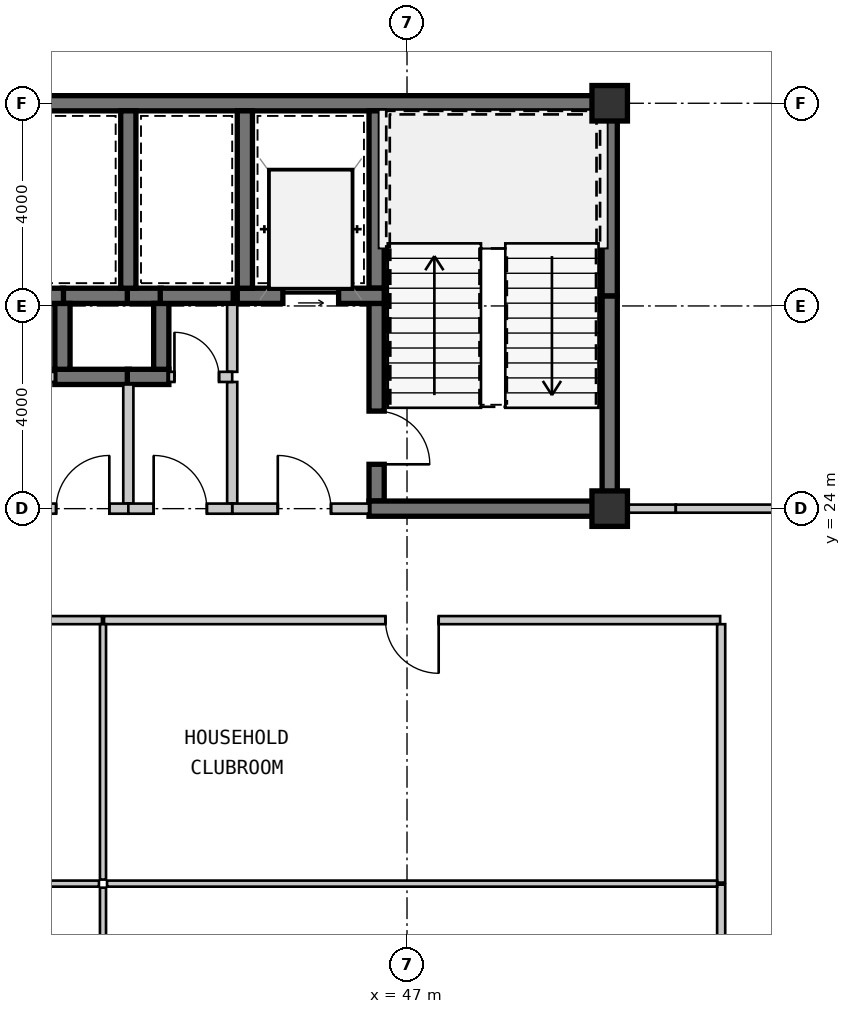
"""IFC4 building model, lengths in metres.
Left out: names, types, materials, properties, quantities, classifications, styles, units other than length and angle.
Written with IfcOpenShell. Run it as: python <this file> out.ifc"""

import sys

from ifc_helpers import new_model, si_unit, direction, frame, frame_2d, origin, origin_2d, place, context, subcontext, project, spatial, rectangle, extrude, source, transform, mapped, element, fill, save


model = new_model("IFC4")
c1 = context("Model", 3, precision=1e-05, world=origin(), true_north=direction((0.0, 1.0)))
c2 = subcontext(c1, "Body", "Model", "MODEL_VIEW")
j1 = project(units=[si_unit("LENGTHUNIT", "METRE"), si_unit("PLANEANGLEUNIT", "RADIAN")], contexts=[c1])
p1 = place(None, origin())
s1 = spatial("IfcSite", under=j1, at=p1, CompositionType="ELEMENT")
p2 = place(p1, origin())
s2 = spatial("IfcBuilding", under=s1, at=p2, CompositionType="ELEMENT")
p3 = place(p2, frame((0.0, 0.0, 99.75)))
s3 = spatial("IfcBuildingStorey", under=s2, at=p3, CompositionType="ELEMENT", Elevation=99.75)
m1 = source(origin(), c2, "Body", "SweptSolid", [
    extrude(rectangle(XDim=0.7, YDim=0.7, at=origin_2d()), origin(), (0.0, 0.0, 1.0), 3.15),
])
for number, where, z_axis, x_axis in (
    (1, (51.0, 24.0, 0.0), (0.0, 0.0, 1.0), (1.0, 0.0, 0.0)),
    (2, (51.0, 32.0, 0.0), (0.0, 0.0, 1.0), (1.0, 0.0, 0.0)),
):
    element("IfcColumn", number, at=place(p3, frame(where, z_axis=z_axis, x_axis=x_axis)), inside=s3, PredefinedType="COLUMN", context=c2, shape_type="MappedRepresentation", body=[
        mapped(m1, transform((0.0, 0.0, 0.0), scale=1.0)),
    ])
m2 = source(origin(), c2, "Body", "SweptSolid", [
    extrude(rectangle(XDim=11.95, YDim=0.3, at=frame_2d((5.975, 0.0))), origin(), (0.0, 0.0, 1.0), 2.93),
])
p4 = place(p3, frame((39.2, 32.0, 0.0), z_axis=(0.0, 0.0, 1.0), x_axis=(1.0, 0.0, 0.0)))
e3 = element("IfcWall", 3, at=p4, inside=s3, PredefinedType="SHEAR", context=c2, shape_type="MappedRepresentation", body=[
    mapped(m2, transform((0.0, 0.0, 0.0), scale=1.0)),
])
m3 = source(origin(), c2, "Body", "SweptSolid", [
    extrude(rectangle(XDim=4.05, YDim=0.3, at=frame_2d((2.025, 0.0))), origin(), (0.0, 0.0, 1.0), 2.93),
])
p5 = place(p3, frame((51.0, 24.15, 0.0), z_axis=(0.0, 0.0, 1.0), x_axis=(0.0, 1.0, 0.0)))
e4 = element("IfcWall", 4, at=p5, inside=s3, PredefinedType="SHEAR", context=c2, shape_type="MappedRepresentation", body=[
    mapped(m3, transform((0.0, 0.0, 0.0), scale=1.0)),
])
m4 = source(origin(), c2, "Body", "SweptSolid", [
    extrude(rectangle(XDim=3.65, YDim=0.3, at=frame_2d((1.825, 0.0))), origin(), (0.0, 0.0, 1.0), 2.93),
])
p6 = place(p3, frame((51.0, 28.2, 0.0), z_axis=(0.0, 0.0, 1.0), x_axis=(0.0, 1.0, 0.0)))
e5 = element("IfcWall", 5, at=p6, inside=s3, PredefinedType="SHEAR", context=c2, shape_type="MappedRepresentation", body=[
    mapped(m4, transform((0.0, 0.0, 0.0), scale=1.0)),
])
m5 = source(origin(), c2, "Body", "SweptSolid", [
    extrude(rectangle(XDim=3.5, YDim=0.3, at=frame_2d((1.75, 0.0))), origin(), (0.0, 0.0, 1.0), 2.93),
])
p7 = place(p3, frame((46.4, 31.85, 0.0), z_axis=(0.0, 0.0, 1.0), x_axis=(0.0, -1.0, 0.0)))
e6 = element("IfcWall", 6, at=p7, inside=s3, PredefinedType="SHEAR", context=c2, shape_type="MappedRepresentation", body=[
    mapped(m5, transform((0.0, 0.0, 0.0), scale=1.0)),
])
m6 = source(origin(), c2, "Body", "SweptSolid", [
    extrude(rectangle(XDim=3.9, YDim=0.3, at=frame_2d((1.95, 0.0))), origin(), (0.0, 0.0, 1.0), 2.93),
])
p8 = place(p3, frame((46.4, 28.05, 0.0), z_axis=(0.0, 0.0, 1.0), x_axis=(0.0, -1.0, 0.0)))
e7 = element("IfcWall", 7, at=p8, inside=s3, PredefinedType="SHEAR", context=c2, shape_type="MappedRepresentation", body=[
    mapped(m6, transform((0.0, 0.0, 0.0), scale=1.0)),
])
m7 = source(origin(), c2, "Body", "SweptSolid", [
    extrude(rectangle(XDim=1.05, YDim=2.1, at=frame_2d((0.525, 1.05))), frame((0.0, 0.16, 0.0), z_axis=(0.0, -1.0, 0.0), x_axis=(1.0, 0.0, 0.0)), (0.0, 0.0, 1.0), 0.32),
])
p9 = place(p8, frame((2.125, 0.0, 0.0)))
e8 = element("IfcOpeningElement", 8, at=p9, cuts=e7, PredefinedType="OPENING", context=c2, shape_type="MappedRepresentation", body=[
    mapped(m7, transform((0.0, 0.0, 0.0), scale=1.0)),
])
m8 = source(origin(), c2, "Body", "SweptSolid", [
    extrude(rectangle(XDim=4.9, YDim=0.3, at=frame_2d((2.45, 0.0))), origin(), (0.0, 0.0, 1.0), 2.93),
])
p10 = place(p3, frame((46.25, 24.0, 0.0), z_axis=(0.0, 0.0, 1.0), x_axis=(1.0, 0.0, 0.0)))
e9 = element("IfcWall", 9, at=p10, inside=s3, PredefinedType="SHEAR", context=c2, shape_type="MappedRepresentation", body=[
    mapped(m8, transform((0.0, 0.0, 0.0), scale=1.0)),
])
m9 = source(origin(), c2, "Body", "SweptSolid", [
    extrude(rectangle(XDim=2.9, YDim=0.3, at=frame_2d((1.45, 0.0))), origin(), (0.0, 0.0, 1.0), 2.93),
])
p11 = place(p3, frame((43.65, 28.2, 0.0), z_axis=(0.0, 0.0, 1.0), x_axis=(1.0, 0.0, 0.0)))
e10 = element("IfcWall", 10, at=p11, inside=s3, PredefinedType="SHEAR", context=c2, shape_type="MappedRepresentation", body=[
    mapped(m9, transform((0.0, 0.0, 0.0), scale=1.0)),
])
m10 = source(origin(), c2, "Body", "SweptSolid", [
    extrude(rectangle(XDim=1.1, YDim=2.15, at=frame_2d((0.55, 1.075))), frame((0.0, 0.16, 0.0), z_axis=(0.0, -1.0, 0.0), x_axis=(1.0, 0.0, 0.0)), (0.0, 0.0, 1.0), 0.32),
])
p12 = place(p11, frame((0.9, 0.0, 0.0)))
e11 = element("IfcOpeningElement", 11, at=p12, cuts=e10, PredefinedType="OPENING", context=c2, shape_type="MappedRepresentation", body=[
    mapped(m10, transform((0.0, 0.0, 0.0), scale=1.0)),
])
p13 = place(p3, frame((43.8, 31.85, 0.0), z_axis=(0.0, 0.0, 1.0), x_axis=(0.0, -1.0, 0.0)))
e12 = element("IfcWall", 12, at=p13, inside=s3, PredefinedType="SHEAR", context=c2, shape_type="MappedRepresentation", body=[
    mapped(m5, transform((0.0, 0.0, 0.0), scale=1.0)),
])
m11 = source(origin(), c2, "Body", "SweptSolid", [
    extrude(rectangle(XDim=2.4, YDim=0.2, at=frame_2d((1.2, 0.0))), origin(), (0.0, 0.0, 1.0), 2.93),
])
p14 = place(p3, frame((43.55, 26.5, 0.0), z_axis=(0.0, 0.0, 1.0), x_axis=(0.0, -1.0, 0.0)))
e13 = element("IfcWall", 13, at=p14, inside=s3, PredefinedType="SOLIDWALL", context=c2, shape_type="MappedRepresentation", body=[
    mapped(m11, transform((0.0, 0.0, 0.0), scale=1.0)),
])
m12 = source(origin(), c2, "Body", "SweptSolid", [
    extrude(rectangle(XDim=1.35, YDim=0.2, at=frame_2d((0.675, 0.0))), origin(), (0.0, 0.0, 1.0), 2.93),
])
p15 = place(p3, frame((43.55, 28.05, 0.0), z_axis=(0.0, 0.0, 1.0), x_axis=(0.0, -1.0, 0.0)))
e14 = element("IfcWall", 14, at=p15, inside=s3, PredefinedType="SOLIDWALL", context=c2, shape_type="MappedRepresentation", body=[
    mapped(m12, transform((0.0, 0.0, 0.0), scale=1.0)),
])
m13 = source(origin(), c2, "Body", "SweptSolid", [
    extrude(rectangle(XDim=2.7, YDim=0.2, at=frame_2d((1.35, 0.0))), origin(), (0.0, 0.0, 1.0), 2.397),
])
p16 = place(p3, frame((43.55, 24.0, 0.0), z_axis=(0.0, 0.0, 1.0), x_axis=(1.0, 0.0, 0.0)))
e15 = element("IfcWall", 15, at=p16, inside=s3, PredefinedType="SOLIDWALL", context=c2, shape_type="MappedRepresentation", body=[
    mapped(m13, transform((0.0, 0.0, 0.0), scale=1.0)),
])
m14 = source(origin(), c2, "Body", "SweptSolid", [
    extrude(rectangle(XDim=1.05, YDim=2.1, at=frame_2d((0.525, 1.05))), frame((0.0, 0.11, 0.0), z_axis=(0.0, -1.0, 0.0), x_axis=(1.0, 0.0, 0.0)), (0.0, 0.0, 1.0), 0.22),
])
p17 = place(p16, frame((0.9, 0.0, 0.0)))
e16 = element("IfcOpeningElement", 16, at=p17, cuts=e15, PredefinedType="OPENING", context=c2, shape_type="MappedRepresentation", body=[
    mapped(m14, transform((0.0, 0.0, 0.0), scale=1.0)),
])
m15 = source(origin(), c2, "Body", "SweptSolid", [
    extrude(rectangle(XDim=1.32, YDim=0.3, at=frame_2d((0.66, 0.0))), origin(), (0.0, 0.0, 1.0), 2.93),
])
p18 = place(p3, frame((41.52, 28.2, 0.0), z_axis=(0.0, 0.0, 1.0), x_axis=(-1.0, 0.0, 0.0)))
e17 = element("IfcWall", 17, at=p18, inside=s3, PredefinedType="SHEAR", context=c2, shape_type="MappedRepresentation", body=[
    mapped(m15, transform((0.0, 0.0, 0.0), scale=1.0)),
])
m16 = source(origin(), c2, "Body", "SweptSolid", [
    extrude(rectangle(XDim=0.67, YDim=0.3, at=frame_2d((0.335, 0.0))), origin(), (0.0, 0.0, 1.0), 2.93),
])
p19 = place(p3, frame((42.15, 28.2, 0.0), z_axis=(0.0, 0.0, 1.0), x_axis=(-1.0, 0.0, 0.0)))
e18 = element("IfcWall", 18, at=p19, inside=s3, PredefinedType="SHEAR", context=c2, shape_type="MappedRepresentation", body=[
    mapped(m16, transform((0.0, 0.0, 0.0), scale=1.0)),
])
m17 = source(origin(), c2, "Body", "SweptSolid", [
    extrude(rectangle(XDim=1.47, YDim=0.3, at=frame_2d((0.735, 0.0))), origin(), (0.0, 0.0, 1.0), 2.93),
])
p20 = place(p3, frame((40.05, 26.6, 0.0), z_axis=(0.0, 0.0, 1.0), x_axis=(1.0, 0.0, 0.0)))
e19 = element("IfcWall", 19, at=p20, inside=s3, PredefinedType="SHEAR", context=c2, shape_type="MappedRepresentation", body=[
    mapped(m17, transform((0.0, 0.0, 0.0), scale=1.0)),
])
m18 = source(origin(), c2, "Body", "SweptSolid", [
    extrude(rectangle(XDim=1.3, YDim=0.3, at=frame_2d((0.65, 0.0))), origin(), (0.0, 0.0, 1.0), 2.93),
])
p21 = place(p3, frame((40.2, 28.05, 0.0), z_axis=(0.0, 0.0, 1.0), x_axis=(0.0, -1.0, 0.0)))
e20 = element("IfcWall", 20, at=p21, inside=s3, PredefinedType="SHEAR", context=c2, shape_type="MappedRepresentation", body=[
    mapped(m18, transform((0.0, 0.0, 0.0), scale=1.0)),
])
m19 = source(origin(), c2, "Body", "SweptSolid", [
    extrude(rectangle(XDim=0.82, YDim=0.3, at=frame_2d((0.41, 0.0))), origin(), (0.0, 0.0, 1.0), 2.93),
])
p22 = place(p3, frame((41.48, 26.6, 0.0), z_axis=(0.0, 0.0, 1.0), x_axis=(1.0, 0.0, 0.0)))
e21 = element("IfcWall", 21, at=p22, inside=s3, PredefinedType="SHEAR", context=c2, shape_type="MappedRepresentation", body=[
    mapped(m19, transform((0.0, 0.0, 0.0), scale=1.0)),
])
p23 = place(p3, frame((42.15, 26.75, 0.0), z_axis=(0.0, 0.0, 1.0), x_axis=(0.0, 1.0, 0.0)))
e22 = element("IfcWall", 22, at=p23, inside=s3, PredefinedType="SHEAR", context=c2, shape_type="MappedRepresentation", body=[
    mapped(m18, transform((0.0, 0.0, 0.0), scale=1.0)),
])
p24 = place(p3, frame((41.5, 28.35, 0.0), z_axis=(0.0, 0.0, 1.0), x_axis=(0.0, 1.0, 0.0)))
e23 = element("IfcWall", 23, at=p24, inside=s3, PredefinedType="SHEAR", context=c2, shape_type="MappedRepresentation", body=[
    mapped(m5, transform((0.0, 0.0, 0.0), scale=1.0)),
])
m20 = source(origin(), c2, "Body", "SweptSolid", [
    extrude(rectangle(XDim=1.02, YDim=0.3, at=frame_2d((0.51, 0.0))), origin(), (0.0, 0.0, 1.0), 2.93),
])
p25 = place(p3, frame((39.2, 28.2, 0.0), z_axis=(0.0, 0.0, 1.0), x_axis=(1.0, 0.0, 0.0)))
e24 = element("IfcWall", 24, at=p25, inside=s3, PredefinedType="SHEAR", context=c2, shape_type="MappedRepresentation", body=[
    mapped(m20, transform((0.0, 0.0, 0.0), scale=1.0)),
])
m21 = source(origin(), c2, "Body", "SweptSolid", [
    extrude(rectangle(XDim=1.44, YDim=0.3, at=frame_2d((0.72, 0.0))), origin(), (0.0, 0.0, 1.0), 2.93),
])
p26 = place(p3, frame((42.13, 28.2, 0.0), z_axis=(0.0, 0.0, 1.0), x_axis=(1.0, 0.0, 0.0)))
e25 = element("IfcWall", 25, at=p26, inside=s3, PredefinedType="SHEAR", context=c2, shape_type="MappedRepresentation", body=[
    mapped(m21, transform((0.0, 0.0, 0.0), scale=1.0)),
])
m22 = source(origin(), c2, "Body", "SweptSolid", [
    extrude(rectangle(XDim=0.85, YDim=0.2, at=frame_2d((0.425, 0.0))), origin(), (0.0, 0.0, 1.0), 2.93),
])
p27 = place(p3, frame((39.2, 26.6, 0.0), z_axis=(0.0, 0.0, 1.0), x_axis=(1.0, 0.0, 0.0)))
e26 = element("IfcWall", 26, at=p27, inside=s3, PredefinedType="SOLIDWALL", context=c2, shape_type="MappedRepresentation", body=[
    mapped(m22, transform((0.0, 0.0, 0.0), scale=1.0)),
])
m23 = source(origin(), c2, "Body", "SweptSolid", [
    extrude(rectangle(XDim=2.35, YDim=0.2, at=frame_2d((1.175, 0.0))), origin(), (0.0, 0.0, 1.0), 2.93),
])
p28 = place(p3, frame((41.5, 26.45, 0.0), z_axis=(0.0, 0.0, 1.0), x_axis=(0.0, -1.0, 0.0)))
e27 = element("IfcWall", 27, at=p28, inside=s3, PredefinedType="SOLIDWALL", context=c2, shape_type="MappedRepresentation", body=[
    mapped(m23, transform((0.0, 0.0, 0.0), scale=1.0)),
])
m24 = source(origin(), c2, "Body", "SweptSolid", [
    extrude(rectangle(XDim=2.3, YDim=0.2, at=frame_2d((1.15, 0.0))), origin(), (0.0, 0.0, 1.0), 2.397),
])
p29 = place(p3, frame((41.5, 24.0, 0.0), z_axis=(0.0, 0.0, 1.0), x_axis=(-1.0, 0.0, 0.0)))
e28 = element("IfcWall", 28, at=p29, inside=s3, PredefinedType="SOLIDWALL", context=c2, shape_type="MappedRepresentation", body=[
    mapped(m24, transform((0.0, 0.0, 0.0), scale=1.0)),
])
p30 = place(p29, frame((0.375, 0.0, 0.0)))
e29 = element("IfcOpeningElement", 29, at=p30, cuts=e28, PredefinedType="OPENING", context=c2, shape_type="MappedRepresentation", body=[
    mapped(m14, transform((0.0, 0.0, 0.0), scale=1.0)),
])
m25 = source(origin(), c2, "Body", "SweptSolid", [
    extrude(rectangle(XDim=1.25, YDim=0.2, at=frame_2d((0.625, 0.0))), origin(), (0.0, 0.0, 1.0), 2.93),
])
p31 = place(p3, frame((42.3, 26.6, 0.0), z_axis=(0.0, 0.0, 1.0), x_axis=(1.0, 0.0, 0.0)))
e30 = element("IfcWall", 30, at=p31, inside=s3, PredefinedType="SOLIDWALL", context=c2, shape_type="MappedRepresentation", body=[
    mapped(m25, transform((0.0, 0.0, 0.0), scale=1.0)),
])
m26 = source(origin(), c2, "Body", "SweptSolid", [
    extrude(rectangle(XDim=0.88, YDim=2.1, at=frame_2d((0.44, 1.05))), frame((0.0, 0.11, 0.0), z_axis=(0.0, -1.0, 0.0), x_axis=(1.0, 0.0, 0.0)), (0.0, 0.0, 1.0), 0.22),
])
p32 = place(p31, frame((0.11, 0.0, 0.0)))
e31 = element("IfcOpeningElement", 31, at=p32, cuts=e30, PredefinedType="OPENING", context=c2, shape_type="MappedRepresentation", body=[
    mapped(m26, transform((0.0, 0.0, 0.0), scale=1.0)),
])
m27 = source(origin(), c2, "Body", "SweptSolid", [
    extrude(rectangle(XDim=2.05, YDim=0.2, at=frame_2d((1.025, 0.0))), origin(), (0.0, 0.0, 1.0), 2.397),
])
p33 = place(p3, frame((43.55, 24.0, 0.0), z_axis=(0.0, 0.0, 1.0), x_axis=(-1.0, 0.0, 0.0)))
e32 = element("IfcWall", 32, at=p33, inside=s3, PredefinedType="SOLIDWALL", context=c2, shape_type="MappedRepresentation", body=[
    mapped(m27, transform((0.0, 0.0, 0.0), scale=1.0)),
])
p34 = place(p33, frame((0.5, 0.0, 0.0)))
e33 = element("IfcOpeningElement", 33, at=p34, cuts=e32, PredefinedType="OPENING", context=c2, shape_type="MappedRepresentation", body=[
    mapped(m14, transform((0.0, 0.0, 0.0), scale=1.0)),
])
m28 = source(origin(), c2, "Body", "SweptSolid", [
    extrude(rectangle(XDim=12.159, YDim=0.16, at=frame_2d((6.08, 0.0))), origin(), (0.0, 0.0, 1.0), 2.93),
])
p35 = place(p3, frame((40.98, 21.8, 0.0), z_axis=(0.0, 0.0, 1.0), x_axis=(-1.0, 0.0, 0.0)))
e34 = element("IfcWall", 34, at=p35, inside=s3, PredefinedType="PARTITIONING", context=c2, shape_type="MappedRepresentation", body=[
    mapped(m28, transform((0.0, 0.0, 0.0), scale=1.0)),
])
m29 = source(origin(), c2, "Body", "SweptSolid", [
    extrude(rectangle(XDim=1.05, YDim=2.1, at=frame_2d((0.525, 1.05))), frame((0.0, 0.09, 0.0), z_axis=(0.0, -1.0, 0.0), x_axis=(1.0, 0.0, 0.0)), (0.0, 0.0, 1.0), 0.18),
])
p36 = place(p35, frame((5.555, 0.0, 0.0)))
e35 = element("IfcOpeningElement", 35, at=p36, cuts=e34, PredefinedType="OPENING", context=c2, shape_type="MappedRepresentation", body=[
    mapped(m29, transform((0.0, 0.0, 0.0), scale=1.0)),
])
m30 = source(origin(), c2, "Body", "SweptSolid", [
    extrude(rectangle(XDim=5.16, YDim=0.16, at=frame_2d((2.58, 0.0))), origin(), (0.0, 0.0, 1.0), 2.93),
])
p37 = place(p3, frame((53.2, 11.42, 0.0), z_axis=(0.0, 0.0, 1.0), x_axis=(0.0, 1.0, 0.0)))
e36 = element("IfcWall", 36, at=p37, inside=s3, PredefinedType="PARTITIONING", context=c2, shape_type="MappedRepresentation", body=[
    mapped(m30, transform((0.0, 0.0, 0.0), scale=1.0)),
])
p38 = place(p3, frame((53.18, 21.8, 0.0), z_axis=(0.0, 0.0, 1.0), x_axis=(-1.0, 0.0, 0.0)))
e37 = element("IfcWall", 37, at=p38, inside=s3, PredefinedType="PARTITIONING", context=c2, shape_type="MappedRepresentation", body=[
    mapped(m28, transform((0.0, 0.0, 0.0), scale=1.0)),
])
p39 = place(p38, frame((5.555, 0.0, 0.0)))
e38 = element("IfcOpeningElement", 38, at=p39, cuts=e37, PredefinedType="OPENING", context=c2, shape_type="MappedRepresentation", body=[
    mapped(m29, transform((0.0, 0.0, 0.0), scale=1.0)),
])
m31 = source(origin(), c2, "Body", "SweptSolid", [
    extrude(rectangle(XDim=5.1, YDim=0.16, at=frame_2d((2.55, 0.0))), origin(), (0.0, 0.0, 1.0), 2.93),
])
p40 = place(p3, frame((53.2, 16.62, 0.0), z_axis=(0.0, 0.0, 1.0), x_axis=(0.0, 1.0, 0.0)))
e39 = element("IfcWall", 39, at=p40, inside=s3, PredefinedType="PARTITIONING", context=c2, shape_type="MappedRepresentation", body=[
    mapped(m31, transform((0.0, 0.0, 0.0), scale=1.0)),
])
m32 = source(origin(), c2, "Body", "SweptSolid", [
    extrude(rectangle(XDim=1.155, YDim=0.16, at=frame_2d((0.577, 0.0))), origin(), (0.0, 0.0, 1.0), 2.328),
])
p41 = place(p3, frame((51.15, 24.0, 0.0), z_axis=(0.0, 0.0, 1.0), x_axis=(1.0, 0.0, 0.0)))
e40 = element("IfcWall", 40, at=p41, inside=s3, PredefinedType="PARTITIONING", context=c2, shape_type="MappedRepresentation", body=[
    mapped(m32, transform((0.0, 0.0, 0.0), scale=1.0)),
])
m33 = source(origin(), c2, "Body", "SweptSolid", [
    extrude(rectangle(XDim=3.016, YDim=0.16, at=frame_2d((1.508, 0.0))), origin(), (0.0, 0.0, 1.0), 2.93),
])
p42 = place(p3, frame((52.304, 24.0, 0.0), z_axis=(0.0, 0.0, 1.0), x_axis=(1.0, 0.0, 0.0)))
e41 = element("IfcWall", 41, at=p42, inside=s3, PredefinedType="PARTITIONING", context=c2, shape_type="MappedRepresentation", body=[
    mapped(m33, transform((0.0, 0.0, 0.0), scale=1.0)),
])
m34 = source(origin(), c2, "Body", "SweptSolid", [
    extrude(rectangle(XDim=12.04, YDim=0.12, at=frame_2d((6.02, 0.0))), origin(), (0.0, 0.0, 1.0), 2.93),
])
p43 = place(p3, frame((28.88, 16.6, 0.0), z_axis=(0.0, 0.0, 1.0), x_axis=(1.0, 0.0, 0.0)))
e42 = element("IfcWall", 42, at=p43, inside=s3, PredefinedType="PARTITIONING", context=c2, shape_type="MappedRepresentation", body=[
    mapped(m34, transform((0.0, 0.0, 0.0), scale=1.0)),
])
m35 = source(origin(), c2, "Body", "SweptSolid", [
    extrude(rectangle(XDim=1.104, YDim=0.12, at=frame_2d((0.552, 0.0))), origin(), (0.0, 0.0, 1.0), 2.93),
])
p44 = place(p3, frame((41.0, 16.52, 0.0), z_axis=(0.0, 0.0, 1.0), x_axis=(0.0, -1.0, 0.0)))
e43 = element("IfcWall", 43, at=p44, inside=s3, PredefinedType="PARTITIONING", context=c2, shape_type="MappedRepresentation", body=[
    mapped(m35, transform((0.0, 0.0, 0.0), scale=1.0)),
])
m36 = source(origin(), c2, "Body", "SweptSolid", [
    extrude(rectangle(XDim=5.04, YDim=0.12, at=frame_2d((2.52, 0.0))), origin(), (0.0, 0.0, 1.0), 2.93),
])
p45 = place(p3, frame((41.0, 21.72, 0.0), z_axis=(0.0, 0.0, 1.0), x_axis=(0.0, -1.0, 0.0)))
e44 = element("IfcWall", 44, at=p45, inside=s3, PredefinedType="PARTITIONING", context=c2, shape_type="MappedRepresentation", body=[
    mapped(m36, transform((0.0, 0.0, 0.0), scale=1.0)),
])
p46 = place(p3, frame((41.08, 16.6, 0.0), z_axis=(0.0, 0.0, 1.0), x_axis=(1.0, 0.0, 0.0)))
e45 = element("IfcWall", 45, at=p46, inside=s3, PredefinedType="PARTITIONING", context=c2, shape_type="MappedRepresentation", body=[
    mapped(m34, transform((0.0, 0.0, 0.0), scale=1.0)),
])
m37 = source(origin(), c2, "Body", "SweptSolid", [
    extrude(rectangle(XDim=1.05, YDim=2.1, at=frame_2d((0.525, 1.05))), frame((0.0, 0.025, 0.0), z_axis=(0.0, -1.0, 0.0), x_axis=(1.0, 0.0, 0.0)), (0.0, 0.0, 1.0), 0.05),
])
p47 = place(p9, origin())
e46 = element("IfcDoor", 46, at=p47, inside=s3, OperationType="SINGLE_SWING_RIGHT", PredefinedType="DOOR", context=c2, shape_type="MappedRepresentation", body=[
    mapped(m37, transform((0.0, 0.0, 0.0), scale=1.0)),
])
fill(e8, e46)
m38 = source(origin(), c2, "Body", "SweptSolid", [
    extrude(rectangle(XDim=1.1, YDim=2.15, at=frame_2d((0.55, 1.075))), frame((0.0, 0.025, 0.0), z_axis=(0.0, -1.0, 0.0), x_axis=(1.0, 0.0, 0.0)), (0.0, 0.0, 1.0), 0.05),
])
p48 = place(p12, origin())
e47 = element("IfcDoor", 47, at=p48, inside=s3, OperationType="SLIDING_TO_LEFT", PredefinedType="DOOR", context=c2, shape_type="MappedRepresentation", body=[
    mapped(m38, transform((0.0, 0.0, 0.0), scale=1.0)),
])
fill(e11, e47)
p49 = place(p17, origin())
e48 = element("IfcDoor", 48, at=p49, inside=s3, OperationType="SINGLE_SWING_LEFT", PredefinedType="DOOR", context=c2, shape_type="MappedRepresentation", body=[
    mapped(m37, transform((0.0, 0.0, 0.0), scale=1.0)),
])
fill(e16, e48)
p50 = place(p30, frame((1.05, 0.0, 0.0), z_axis=(0.0, 0.0, 1.0), x_axis=(-1.0, 0.0, 0.0)))
e49 = element("IfcDoor", 49, at=p50, inside=s3, OperationType="SINGLE_SWING_RIGHT", PredefinedType="DOOR", context=c2, shape_type="MappedRepresentation", body=[
    mapped(m37, transform((0.0, 0.0, 0.0), scale=1.0)),
])
fill(e29, e49)
m39 = source(origin(), c2, "Body", "SweptSolid", [
    extrude(rectangle(XDim=0.88, YDim=2.1, at=frame_2d((0.44, 1.05))), frame((0.0, 0.025, 0.0), z_axis=(0.0, -1.0, 0.0), x_axis=(1.0, 0.0, 0.0)), (0.0, 0.0, 1.0), 0.05),
])
p51 = place(p32, origin())
e50 = element("IfcDoor", 50, at=p51, inside=s3, OperationType="SINGLE_SWING_LEFT", PredefinedType="DOOR", context=c2, shape_type="MappedRepresentation", body=[
    mapped(m39, transform((0.0, 0.0, 0.0), scale=1.0)),
])
fill(e31, e50)
p52 = place(p34, frame((1.05, 0.0, 0.0), z_axis=(0.0, 0.0, 1.0), x_axis=(-1.0, 0.0, 0.0)))
e51 = element("IfcDoor", 51, at=p52, inside=s3, OperationType="SINGLE_SWING_LEFT", PredefinedType="DOOR", context=c2, shape_type="MappedRepresentation", body=[
    mapped(m37, transform((0.0, 0.0, 0.0), scale=1.0)),
])
fill(e33, e51)
p53 = place(p39, origin())
e52 = element("IfcDoor", 52, at=p53, inside=s3, OperationType="SINGLE_SWING_LEFT", PredefinedType="DOOR", context=c2, shape_type="MappedRepresentation", body=[
    mapped(m37, transform((0.0, 0.0, 0.0), scale=1.0)),
])
fill(e38, e52)
save(model, sys.argv[1])
